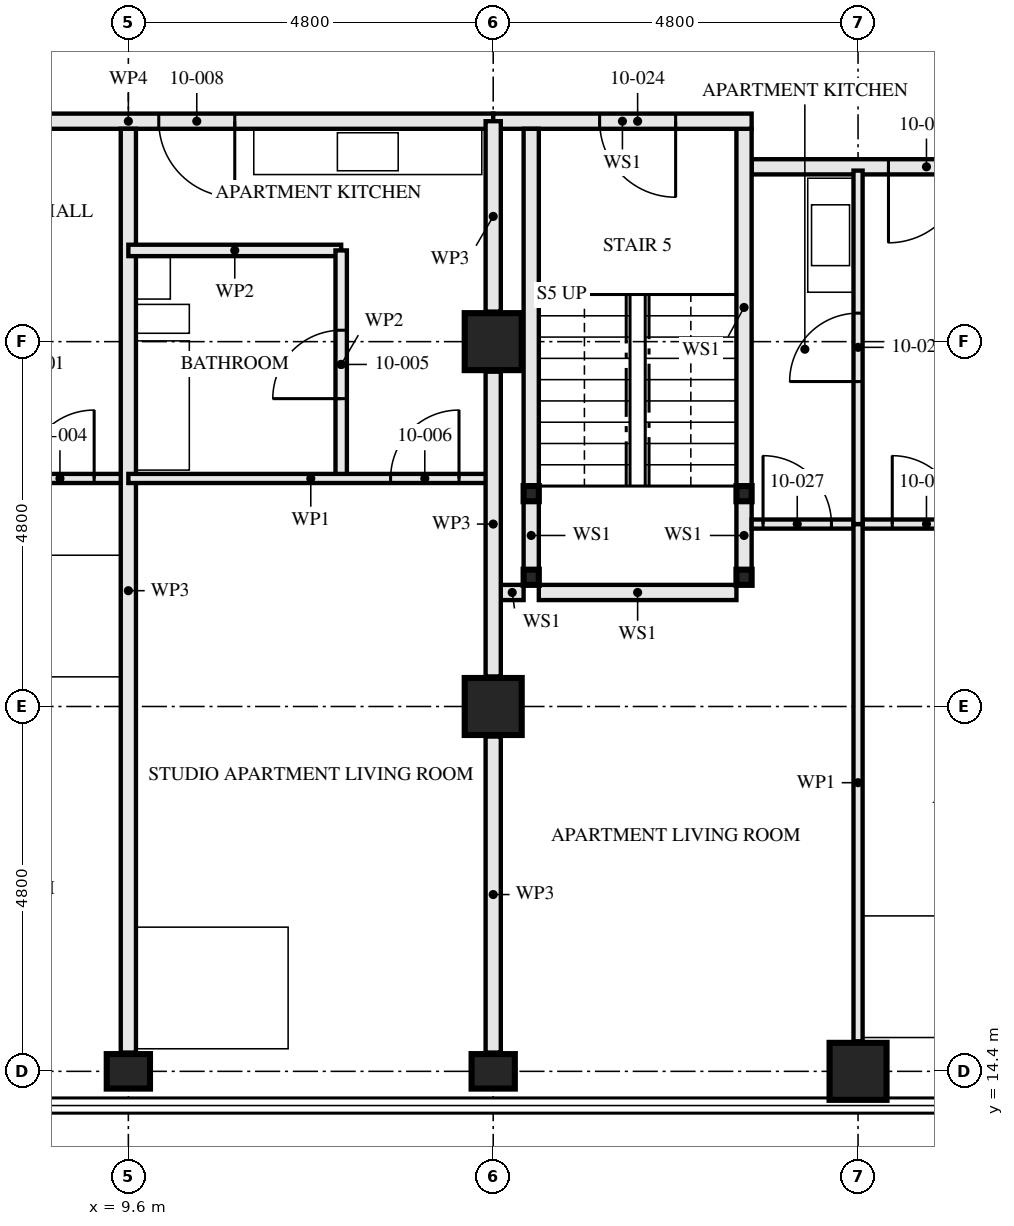
"""IFC4 building model, lengths in metres.
Left out: names, types, materials, properties, quantities, classifications, styles, units other than length and angle.
Written with IfcOpenShell. Run it as: python <this file> out.ifc"""

import sys

from ifc_helpers import new_model, si_unit, direction, frame, frame_2d, origin, origin_2d, place, context, subcontext, project, spatial, rectangle, hollow_rectangle, i_section, extrude, element, fill, save


model = new_model("IFC4")
c1 = context("Model", 3, precision=1e-05, world=origin(), true_north=direction((0.0, 1.0)))
c2 = subcontext(c1, "Body", "Model", "MODEL_VIEW")
j1 = project(units=[si_unit("LENGTHUNIT", "METRE"), si_unit("PLANEANGLEUNIT", "RADIAN")], contexts=[c1])
p1 = place(None, origin())
s1 = spatial("IfcSite", under=j1, at=p1, CompositionType="ELEMENT")
p2 = place(p1, origin())
s2 = spatial("IfcBuilding", under=s1, at=p2, CompositionType="ELEMENT")
p3 = place(p2, frame((0.0, 0.0, 41.0)))
s3 = spatial("IfcBuildingStorey", under=s2, at=p3, CompositionType="ELEMENT", Elevation=41.0)
for number, where, z_axis, x_axis in (
    (1, (9.6, 14.4, 0.0), (0.0, 0.0, 1.0), (0.0, 1.0, 0.0)),
    (2, (14.4, 14.4, 0.0), (0.0, 0.0, 1.0), (0.0, 1.0, 0.0)),
):
    element("IfcColumn", number, at=place(p3, frame(where, z_axis=z_axis, x_axis=x_axis)), inside=s3, PredefinedType="COLUMN", context=c2, shape_type="SweptSolid", body=[
        extrude(i_section(OverallWidth=0.454, OverallDepth=0.569, WebThickness=0.078, FlangeThickness=0.125, FilletRadius=0.015, at=origin_2d()), origin(), (0.0, 0.0, 1.0), 3.5),
    ])
for number, where, z_axis, x_axis in (
    (3, (14.4, 19.2, 0.0), (0.0, 0.0, 1.0), (1.0, 0.0, 0.0)),
    (4, (14.4, 24.0, 0.0), (0.0, 0.0, 1.0), (1.0, 0.0, 0.0)),
    (5, (19.2, 14.4, 0.0), (0.0, 0.0, 1.0), (0.0, 1.0, 0.0)),
):
    element("IfcColumn", number, at=place(p3, frame(where, z_axis=z_axis, x_axis=x_axis)), inside=s3, PredefinedType="COLUMN", context=c2, shape_type="SweptSolid", body=[
        extrude(hollow_rectangle(XDim=0.75, YDim=0.75, WallThickness=0.08, at=origin_2d()), origin(), (0.0, 0.0, 1.0), 3.5),
    ])
for number, where, z_axis, x_axis in (
    (6, (14.9, 20.9, 0.0), (0.0, 0.0, 1.0), (1.0, 0.0, 0.0)),
    (7, (17.7, 20.9, 0.0), (0.0, 0.0, 1.0), (1.0, 0.0, 0.0)),
    (8, (14.9, 22.0, 0.0), (0.0, 0.0, 1.0), (1.0, 0.0, 0.0)),
    (9, (17.7, 22.0, 0.0), (0.0, 0.0, 1.0), (1.0, 0.0, 0.0)),
):
    element("IfcColumn", number, at=place(p3, frame(where, z_axis=z_axis, x_axis=x_axis)), inside=s3, PredefinedType="COLUMN", context=c2, shape_type="SweptSolid", body=[
        extrude(hollow_rectangle(XDim=0.2, YDim=0.2, WallThickness=0.008, at=origin_2d()), origin(), (0.0, 0.0, 1.0), 3.33),
    ])
p4 = place(p3, frame((4.8, 22.2, 0.0), z_axis=(0.0, 0.0, 1.0), x_axis=(1.0, 0.0, 0.0)))
e10 = element("IfcWall", 10, at=p4, inside=s3, PredefinedType="PARTITIONING", context=c2, shape_type="SweptSolid", body=[
    extrude(rectangle(XDim=4.8, YDim=0.12, at=frame_2d((2.4, 0.0))), origin(), (0.0, 0.0, 1.0), 3.33),
])
p5 = place(p4, frame((3.45, 0.0, 0.0)))
e11 = element("IfcOpeningElement", 11, at=p5, cuts=e10, PredefinedType="OPENING", context=c2, shape_type="SweptSolid", body=[
    extrude(rectangle(XDim=0.9, YDim=2.1, at=frame_2d((0.45, 1.05))), frame((0.0, 0.071, 0.0), z_axis=(0.0, -1.0, 0.0), x_axis=(1.0, 0.0, 0.0)), (0.0, 0.0, 1.0), 0.141),
])
p6 = place(p3, frame((9.6, 14.647, 0.0), z_axis=(0.0, 0.0, 1.0), x_axis=(0.0, 1.0, 0.0)))
e12 = element("IfcWall", 12, at=p6, inside=s3, PredefinedType="PARTITIONING", context=c2, shape_type="SweptSolid", body=[
    extrude(rectangle(XDim=12.153, YDim=0.2, at=frame_2d((6.077, 0.0))), origin(), (0.0, 0.0, 1.0), 2.55),
])
p7 = place(p3, frame((12.4, 22.2, 0.0), z_axis=(0.0, 0.0, 1.0), x_axis=(0.0, 1.0, 0.0)))
e13 = element("IfcWall", 13, at=p7, inside=s3, PredefinedType="PARTITIONING", context=c2, shape_type="SweptSolid", body=[
    extrude(rectangle(XDim=3.0, YDim=0.15, at=frame_2d((1.5, 0.0))), origin(), (0.0, 0.0, 1.0), 2.55),
])
p8 = place(p7, frame((1.05, 0.0, 0.0)))
e14 = element("IfcOpeningElement", 14, at=p8, cuts=e13, PredefinedType="OPENING", context=c2, shape_type="SweptSolid", body=[
    extrude(rectangle(XDim=0.9, YDim=2.1, at=frame_2d((0.45, 1.05))), frame((0.0, 0.085, 0.0), z_axis=(0.0, -1.0, 0.0), x_axis=(1.0, 0.0, 0.0)), (0.0, 0.0, 1.0), 0.171),
])
p9 = place(p3, frame((9.6, 25.2, 0.0), z_axis=(0.0, 0.0, 1.0), x_axis=(1.0, 0.0, 0.0)))
e15 = element("IfcWall", 15, at=p9, inside=s3, PredefinedType="PARTITIONING", context=c2, shape_type="SweptSolid", body=[
    extrude(rectangle(XDim=2.8, YDim=0.15, at=frame_2d((1.4, 0.0))), origin(), (0.0, 0.0, 1.0), 3.33),
])
p10 = place(p3, frame((9.6, 22.2, 0.0), z_axis=(0.0, 0.0, 1.0), x_axis=(1.0, 0.0, 0.0)))
e16 = element("IfcWall", 16, at=p10, inside=s3, PredefinedType="PARTITIONING", context=c2, shape_type="SweptSolid", body=[
    extrude(rectangle(XDim=4.8, YDim=0.12, at=frame_2d((2.4, 0.0))), origin(), (0.0, 0.0, 1.0), 3.33),
])
p11 = place(p10, frame((3.45, 0.0, 0.0)))
e17 = element("IfcOpeningElement", 17, at=p11, cuts=e16, PredefinedType="OPENING", context=c2, shape_type="SweptSolid", body=[
    extrude(rectangle(XDim=0.9, YDim=2.1, at=frame_2d((0.45, 1.05))), frame((0.0, 0.071, 0.0), z_axis=(0.0, -1.0, 0.0), x_axis=(1.0, 0.0, 0.0)), (0.0, 0.0, 1.0), 0.141),
])
p12 = place(p3, frame((4.8, 26.9, 0.0), z_axis=(0.0, 0.0, 1.0), x_axis=(1.0, 0.0, 0.0)))
e18 = element("IfcWall", 18, at=p12, inside=s3, PredefinedType="PARTITIONING", context=c2, shape_type="SweptSolid", body=[
    extrude(rectangle(XDim=9.6, YDim=0.2, at=frame_2d((4.8, 0.0))), origin(), (0.0, 0.0, 1.0), 3.33),
])
p13 = place(p12, frame((0.4, 0.0, 0.0)))
e19 = element("IfcOpeningElement", 19, at=p13, cuts=e18, PredefinedType="OPENING", context=c2, shape_type="SweptSolid", body=[
    extrude(rectangle(XDim=1.0, YDim=2.1, at=frame_2d((0.5, 1.05))), frame((0.0, 0.111, 0.0), z_axis=(0.0, -1.0, 0.0), x_axis=(1.0, 0.0, 0.0)), (0.0, 0.0, 1.0), 0.221),
])
p14 = place(p12, frame((5.2, 0.0, 0.0)))
e20 = element("IfcOpeningElement", 20, at=p14, cuts=e18, PredefinedType="OPENING", context=c2, shape_type="SweptSolid", body=[
    extrude(rectangle(XDim=1.0, YDim=2.1, at=frame_2d((0.5, 1.05))), frame((0.0, 0.111, 0.0), z_axis=(0.0, -1.0, 0.0), x_axis=(1.0, 0.0, 0.0)), (0.0, 0.0, 1.0), 0.221),
])
p15 = place(p3, frame((14.9, 21.0, 0.0), z_axis=(0.0, 0.0, 1.0), x_axis=(0.0, 1.0, 0.0)))
e21 = element("IfcWall", 21, at=p15, inside=s3, PredefinedType="SOLIDWALL", context=c2, shape_type="SweptSolid", body=[
    extrude(rectangle(XDim=0.9, YDim=0.2, at=frame_2d((0.45, 0.0))), origin(), (0.0, 0.0, 1.0), 2.99),
])
p16 = place(p3, frame((14.9, 22.1, 0.0), z_axis=(0.0, 0.0, 1.0), x_axis=(0.0, 1.0, 0.0)))
e22 = element("IfcWall", 22, at=p16, inside=s3, PredefinedType="SOLIDWALL", context=c2, shape_type="SweptSolid", body=[
    extrude(rectangle(XDim=4.7, YDim=0.2, at=frame_2d((2.35, 0.0))), origin(), (0.0, 0.0, 1.0), 2.99),
])
p17 = place(p3, frame((17.7, 21.0, 0.0), z_axis=(0.0, 0.0, 1.0), x_axis=(0.0, 1.0, 0.0)))
e23 = element("IfcWall", 23, at=p17, inside=s3, PredefinedType="SOLIDWALL", context=c2, shape_type="SweptSolid", body=[
    extrude(rectangle(XDim=0.9, YDim=0.2, at=frame_2d((0.45, 0.0))), origin(), (0.0, 0.0, 1.0), 2.99),
])
p18 = place(p3, frame((17.7, 22.1, 0.0), z_axis=(0.0, 0.0, 1.0), x_axis=(0.0, 1.0, 0.0)))
e24 = element("IfcWall", 24, at=p18, inside=s3, PredefinedType="SOLIDWALL", context=c2, shape_type="SweptSolid", body=[
    extrude(rectangle(XDim=4.7, YDim=0.2, at=frame_2d((2.35, 0.0))), origin(), (0.0, 0.0, 1.0), 2.99),
])
p19 = place(p3, frame((14.5, 20.7, 0.0), z_axis=(0.0, 0.0, 1.0), x_axis=(1.0, 0.0, 0.0)))
e25 = element("IfcWall", 25, at=p19, inside=s3, PredefinedType="SOLIDWALL", context=c2, shape_type="SweptSolid", body=[
    extrude(rectangle(XDim=0.3, YDim=0.2, at=frame_2d((0.15, 0.0))), origin(), (0.0, 0.0, 1.0), 3.33),
])
p20 = place(p3, frame((15.0, 20.7, 0.0), z_axis=(0.0, 0.0, 1.0), x_axis=(1.0, 0.0, 0.0)))
e26 = element("IfcWall", 26, at=p20, inside=s3, PredefinedType="SOLIDWALL", context=c2, shape_type="SweptSolid", body=[
    extrude(rectangle(XDim=2.6, YDim=0.2, at=frame_2d((1.3, 0.0))), origin(), (0.0, 0.0, 1.0), 3.33),
])
p21 = place(p3, frame((14.4, 26.9, 0.0), z_axis=(0.0, 0.0, 1.0), x_axis=(1.0, 0.0, 0.0)))
e27 = element("IfcWall", 27, at=p21, inside=s3, PredefinedType="SOLIDWALL", context=c2, shape_type="SweptSolid", body=[
    extrude(rectangle(XDim=3.4, YDim=0.2, at=frame_2d((1.7, 0.0))), origin(), (0.0, 0.0, 1.0), 3.33),
])
p22 = place(p21, frame((1.4, 0.0, 0.0)))
e28 = element("IfcOpeningElement", 28, at=p22, cuts=e27, PredefinedType="OPENING", context=c2, shape_type="SweptSolid", body=[
    extrude(rectangle(XDim=1.0, YDim=2.1, at=frame_2d((0.5, 1.05))), frame((0.0, 0.111, 0.0), z_axis=(0.0, -1.0, 0.0), x_axis=(1.0, 0.0, 0.0)), (0.0, 0.0, 1.0), 0.221),
])
p23 = place(p3, frame((19.2, 21.6, 0.0), z_axis=(0.0, 0.0, 1.0), x_axis=(0.0, 1.0, 0.0)))
e29 = element("IfcWall", 29, at=p23, inside=s3, PredefinedType="PARTITIONING", context=c2, shape_type="SweptSolid", body=[
    extrude(rectangle(XDim=4.65, YDim=0.12, at=frame_2d((2.325, 0.0))), origin(), (0.0, 0.0, 1.0), 2.55),
])
p24 = place(p23, frame((1.875, 0.0, 0.0)))
e30 = element("IfcOpeningElement", 30, at=p24, cuts=e29, PredefinedType="OPENING", context=c2, shape_type="SweptSolid", body=[
    extrude(rectangle(XDim=0.9, YDim=2.1, at=frame_2d((0.45, 1.05))), frame((0.0, 0.071, 0.0), z_axis=(0.0, -1.0, 0.0), x_axis=(1.0, 0.0, 0.0)), (0.0, 0.0, 1.0), 0.141),
])
p25 = place(p3, frame((17.8, 21.6, 0.0), z_axis=(0.0, 0.0, 1.0), x_axis=(1.0, 0.0, 0.0)))
e31 = element("IfcWall", 31, at=p25, inside=s3, PredefinedType="PARTITIONING", context=c2, shape_type="SweptSolid", body=[
    extrude(rectangle(XDim=1.4, YDim=0.12, at=frame_2d((0.7, 0.0))), origin(), (0.0, 0.0, 1.0), 3.33),
])
p26 = place(p25, frame((0.15, 0.0, 0.0)))
e32 = element("IfcOpeningElement", 32, at=p26, cuts=e31, PredefinedType="OPENING", context=c2, shape_type="SweptSolid", body=[
    extrude(rectangle(XDim=0.9, YDim=2.1, at=frame_2d((0.45, 1.05))), frame((0.0, 0.071, 0.0), z_axis=(0.0, -1.0, 0.0), x_axis=(1.0, 0.0, 0.0)), (0.0, 0.0, 1.0), 0.141),
])
p27 = place(p3, frame((19.2, 21.6, 0.0), z_axis=(0.0, 0.0, 1.0), x_axis=(1.0, 0.0, 0.0)))
e33 = element("IfcWall", 33, at=p27, inside=s3, PredefinedType="PARTITIONING", context=c2, shape_type="SweptSolid", body=[
    extrude(rectangle(XDim=4.8, YDim=0.12, at=frame_2d((2.4, 0.0))), origin(), (0.0, 0.0, 1.0), 3.33),
])
p28 = place(p27, frame((0.45, 0.0, 0.0)))
e34 = element("IfcOpeningElement", 34, at=p28, cuts=e33, PredefinedType="OPENING", context=c2, shape_type="SweptSolid", body=[
    extrude(rectangle(XDim=0.9, YDim=2.1, at=frame_2d((0.45, 1.05))), frame((0.0, 0.071, 0.0), z_axis=(0.0, -1.0, 0.0), x_axis=(1.0, 0.0, 0.0)), (0.0, 0.0, 1.0), 0.141),
])
p29 = place(p3, frame((19.2, 14.795, 0.0), z_axis=(0.0, 0.0, 1.0), x_axis=(0.0, 1.0, 0.0)))
e35 = element("IfcWall", 35, at=p29, inside=s3, PredefinedType="PARTITIONING", context=c2, shape_type="SweptSolid", body=[
    extrude(rectangle(XDim=6.805, YDim=0.12, at=frame_2d((3.403, 0.0))), origin(), (0.0, 0.0, 1.0), 2.55),
])
p30 = place(p3, frame((17.8, 26.3, 0.0), z_axis=(0.0, 0.0, 1.0), x_axis=(1.0, 0.0, 0.0)))
e36 = element("IfcWall", 36, at=p30, inside=s3, PredefinedType="PARTITIONING", context=c2, shape_type="SweptSolid", body=[
    extrude(rectangle(XDim=11.0, YDim=0.2, at=frame_2d((5.5, 0.0))), origin(), (0.0, 0.0, 1.0), 2.55),
])
p31 = place(p30, frame((1.8, 0.0, 0.0)))
e37 = element("IfcOpeningElement", 37, at=p31, cuts=e36, PredefinedType="OPENING", context=c2, shape_type="SweptSolid", body=[
    extrude(rectangle(XDim=1.0, YDim=2.1, at=frame_2d((0.5, 1.05))), frame((0.0, 0.111, 0.0), z_axis=(0.0, -1.0, 0.0), x_axis=(1.0, 0.0, 0.0)), (0.0, 0.0, 1.0), 0.221),
])
p32 = place(p30, frame((6.6, 0.0, 0.0)))
e38 = element("IfcOpeningElement", 38, at=p32, cuts=e36, PredefinedType="OPENING", context=c2, shape_type="SweptSolid", body=[
    extrude(rectangle(XDim=1.0, YDim=2.1, at=frame_2d((0.5, 1.05))), frame((0.0, 0.111, 0.0), z_axis=(0.0, -1.0, 0.0), x_axis=(1.0, 0.0, 0.0)), (0.0, 0.0, 1.0), 0.221),
])
p33 = place(p3, frame((14.4, 14.647, 0.0), z_axis=(0.0, 0.0, 1.0), x_axis=(0.0, 1.0, 0.0)))
e39 = element("IfcWall", 39, at=p33, inside=s3, PredefinedType="PARTITIONING", context=c2, shape_type="SweptSolid", body=[
    extrude(rectangle(XDim=4.158, YDim=0.2, at=frame_2d((2.079, 0.0))), origin(), (0.0, 0.0, 1.0), 2.32),
])
p34 = place(p3, frame((14.4, 19.595, 0.0), z_axis=(0.0, 0.0, 1.0), x_axis=(0.0, 1.0, 0.0)))
e40 = element("IfcWall", 40, at=p34, inside=s3, PredefinedType="PARTITIONING", context=c2, shape_type="SweptSolid", body=[
    extrude(rectangle(XDim=4.01, YDim=0.2, at=frame_2d((2.005, 0.0))), origin(), (0.0, 0.0, 1.0), 2.32),
])
p35 = place(p3, frame((14.4, 24.395, 0.0), z_axis=(0.0, 0.0, 1.0), x_axis=(0.0, 1.0, 0.0)))
e41 = element("IfcWall", 41, at=p35, inside=s3, PredefinedType="PARTITIONING", context=c2, shape_type="SweptSolid", body=[
    extrude(rectangle(XDim=2.505, YDim=0.2, at=frame_2d((1.252, 0.0))), origin(), (0.0, 0.0, 1.0), 2.32),
])
p36 = place(p5, origin())
e42 = element("IfcDoor", 42, at=p36, inside=s3, OperationType="SINGLE_SWING_LEFT", PredefinedType="DOOR", context=c2, shape_type="SweptSolid", body=[
    extrude(rectangle(XDim=0.9, YDim=2.1, at=frame_2d((0.45, 1.05))), frame((0.0, 0.022, 0.0), z_axis=(0.0, -1.0, 0.0), x_axis=(1.0, 0.0, 0.0)), (0.0, 0.0, 1.0), 0.044),
])
fill(e11, e42)
p37 = place(p8, origin())
e43 = element("IfcDoor", 43, at=p37, inside=s3, OperationType="SINGLE_SWING_RIGHT", PredefinedType="DOOR", context=c2, shape_type="SweptSolid", body=[
    extrude(rectangle(XDim=0.9, YDim=2.1, at=frame_2d((0.45, 1.05))), frame((0.0, 0.022, 0.0), z_axis=(0.0, -1.0, 0.0), x_axis=(1.0, 0.0, 0.0)), (0.0, 0.0, 1.0), 0.044),
])
fill(e14, e43)
p38 = place(p11, origin())
e44 = element("IfcDoor", 44, at=p38, inside=s3, OperationType="SINGLE_SWING_LEFT", PredefinedType="DOOR", context=c2, shape_type="SweptSolid", body=[
    extrude(rectangle(XDim=0.9, YDim=2.1, at=frame_2d((0.45, 1.05))), frame((0.0, 0.022, 0.0), z_axis=(0.0, -1.0, 0.0), x_axis=(1.0, 0.0, 0.0)), (0.0, 0.0, 1.0), 0.044),
])
fill(e17, e44)
p39 = place(p14, frame((1.0, 0.0, 0.0), z_axis=(0.0, 0.0, 1.0), x_axis=(-1.0, 0.0, 0.0)))
e45 = element("IfcDoor", 45, at=p39, inside=s3, OperationType="SINGLE_SWING_RIGHT", PredefinedType="DOOR", context=c2, shape_type="SweptSolid", body=[
    extrude(rectangle(XDim=1.0, YDim=2.1, at=frame_2d((0.5, 1.05))), frame((0.0, 0.027, 0.0), z_axis=(0.0, -1.0, 0.0), x_axis=(1.0, 0.0, 0.0)), (0.0, 0.0, 1.0), 0.054),
])
fill(e20, e45)
p40 = place(p22, frame((1.0, 0.0, 0.0), z_axis=(0.0, 0.0, 1.0), x_axis=(-1.0, 0.0, 0.0)))
e46 = element("IfcDoor", 46, at=p40, inside=s3, OperationType="SINGLE_SWING_RIGHT", PredefinedType="DOOR", context=c2, shape_type="SweptSolid", body=[
    extrude(rectangle(XDim=1.0, YDim=2.1, at=frame_2d((0.5, 1.05))), frame((0.0, 0.032, 0.0), z_axis=(0.0, -1.0, 0.0), x_axis=(1.0, 0.0, 0.0)), (0.0, 0.0, 1.0), 0.064),
])
fill(e28, e46)
p41 = place(p24, origin())
e47 = element("IfcDoor", 47, at=p41, inside=s3, OperationType="SINGLE_SWING_RIGHT", PredefinedType="DOOR", context=c2, shape_type="SweptSolid", body=[
    extrude(rectangle(XDim=0.9, YDim=2.1, at=frame_2d((0.45, 1.05))), frame((0.0, 0.022, 0.0), z_axis=(0.0, -1.0, 0.0), x_axis=(1.0, 0.0, 0.0)), (0.0, 0.0, 1.0), 0.044),
])
fill(e30, e47)
p42 = place(p26, origin())
e48 = element("IfcDoor", 48, at=p42, inside=s3, OperationType="SINGLE_SWING_RIGHT", PredefinedType="DOOR", context=c2, shape_type="SweptSolid", body=[
    extrude(rectangle(XDim=0.9, YDim=2.1, at=frame_2d((0.45, 1.05))), frame((0.0, 0.022, 0.0), z_axis=(0.0, -1.0, 0.0), x_axis=(1.0, 0.0, 0.0)), (0.0, 0.0, 1.0), 0.044),
])
fill(e32, e48)
p43 = place(p28, origin())
e49 = element("IfcDoor", 49, at=p43, inside=s3, OperationType="SINGLE_SWING_RIGHT", PredefinedType="DOOR", context=c2, shape_type="SweptSolid", body=[
    extrude(rectangle(XDim=0.9, YDim=2.1, at=frame_2d((0.45, 1.05))), frame((0.0, 0.022, 0.0), z_axis=(0.0, -1.0, 0.0), x_axis=(1.0, 0.0, 0.0)), (0.0, 0.0, 1.0), 0.044),
])
fill(e34, e49)
p44 = place(p31, frame((1.0, 0.0, 0.0), z_axis=(0.0, 0.0, 1.0), x_axis=(-1.0, 0.0, 0.0)))
e50 = element("IfcDoor", 50, at=p44, inside=s3, OperationType="SINGLE_SWING_LEFT", PredefinedType="DOOR", context=c2, shape_type="SweptSolid", body=[
    extrude(rectangle(XDim=1.0, YDim=2.1, at=frame_2d((0.5, 1.05))), frame((0.0, 0.027, 0.0), z_axis=(0.0, -1.0, 0.0), x_axis=(1.0, 0.0, 0.0)), (0.0, 0.0, 1.0), 0.054),
])
fill(e37, e50)
save(model, sys.argv[1])
